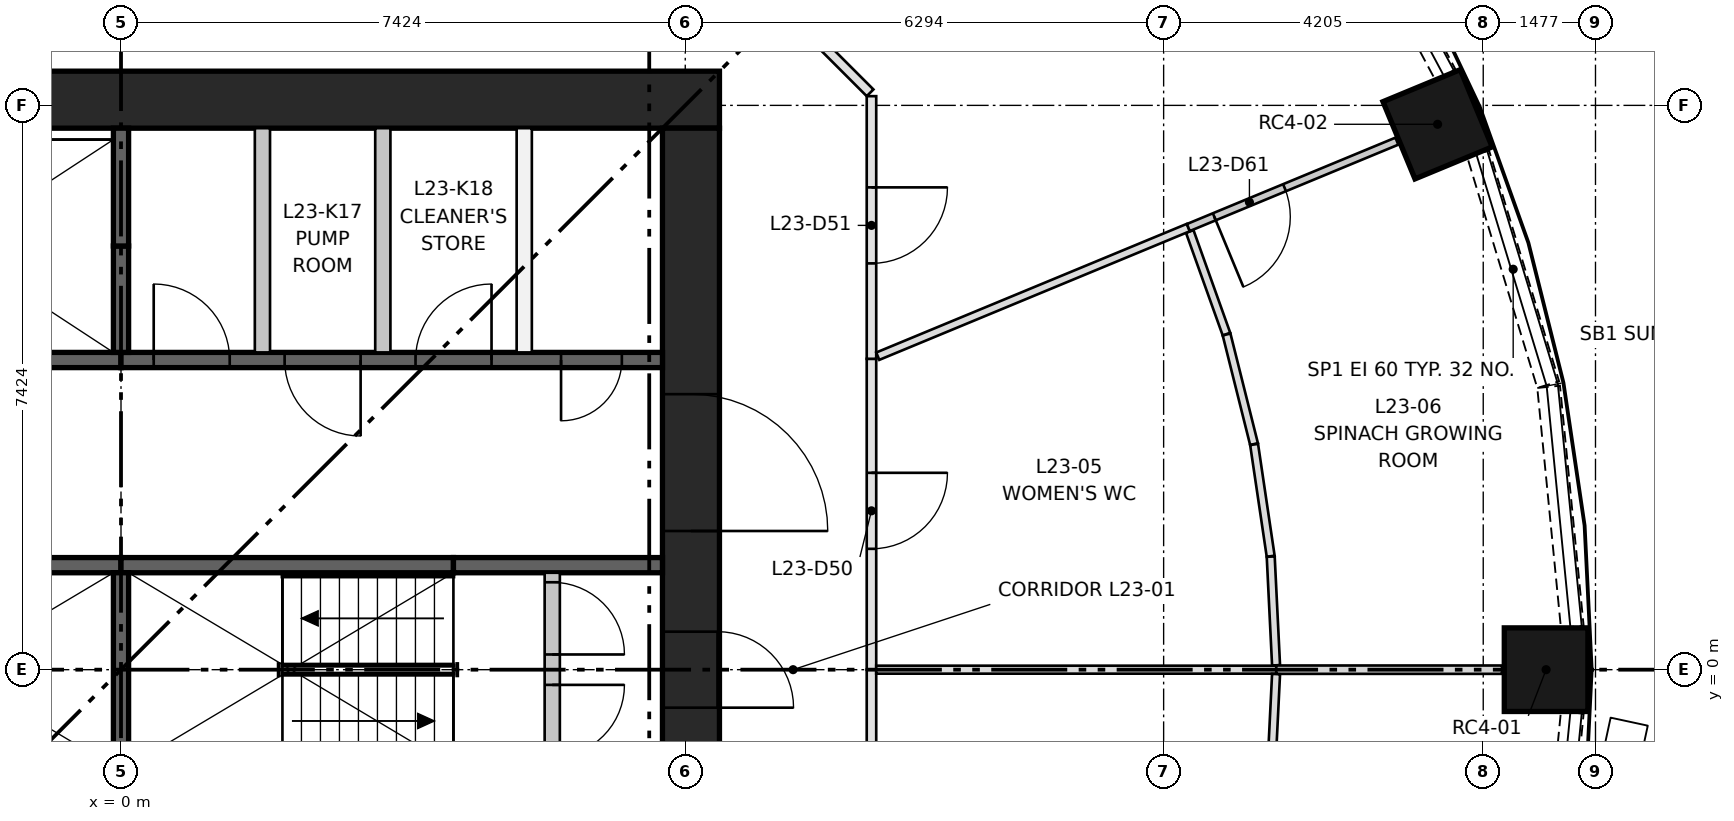
"""IFC4 building model, lengths in metres.
Left out: names, types, materials, properties, quantities, classifications, styles, units other than length and angle.
Written with IfcOpenShell. Run it as: python <this file> out.ifc"""

import sys

from ifc_helpers import new_model, si_unit, direction, frame, frame_2d, origin, origin_2d, place, context, subcontext, project, spatial, rectangle, extrude, element, fill, save


model = new_model("IFC4")
c1 = context("Model", 3, precision=1e-05, world=origin(), true_north=direction((0.0, 1.0)))
c2 = subcontext(c1, "Body", "Model", "MODEL_VIEW")
j1 = project(units=[si_unit("LENGTHUNIT", "METRE"), si_unit("PLANEANGLEUNIT", "RADIAN")], contexts=[c1])
p1 = place(None, origin())
s1 = spatial("IfcSite", under=j1, at=p1, CompositionType="ELEMENT")
p2 = place(p1, origin())
s2 = spatial("IfcBuilding", under=s1, at=p2, CompositionType="ELEMENT")
p3 = place(p2, frame((0.0, 0.0, 91.0)))
s3 = spatial("IfcBuildingStorey", under=s2, at=p3, CompositionType="ELEMENT", Elevation=91.0)
for number, where, z_axis, x_axis in (
    (1, (18.75, 0.0, 0.0), (0.0, 0.0, 1.0), (1.0, 0.0, 0.0)),
    (2, (17.323, 7.175, 0.0), (0.0, 0.0, 1.0), (0.924, 0.383, 0.0)),
):
    element("IfcColumn", number, at=place(p3, frame(where, z_axis=z_axis, x_axis=x_axis)), inside=s3, PredefinedType="COLUMN", context=c2, shape_type="SweptSolid", body=[
        extrude(rectangle(XDim=1.1, YDim=1.1, at=origin_2d()), origin(), (0.0, 0.0, 1.0), 3.65),
    ])
p4 = place(p3, frame((-7.874, 7.499, 0.0), z_axis=(0.0, 0.0, 1.0), x_axis=(1.0, 0.0, 0.0)))
e3 = element("IfcWall", 3, at=p4, inside=s3, PredefinedType="SHEAR", context=c2, shape_type="SweptSolid", body=[
    extrude(rectangle(XDim=15.748, YDim=0.75, at=frame_2d((7.874, 0.0))), origin(), (0.0, 0.0, 1.0), 3.65),
])
p5 = place(p3, frame((7.499, -7.124, 0.0), z_axis=(0.0, 0.0, 1.0), x_axis=(0.0, 1.0, 0.0)))
e4 = element("IfcWall", 4, at=p5, inside=s3, PredefinedType="SHEAR", context=c2, shape_type="SweptSolid", body=[
    extrude(rectangle(XDim=14.248, YDim=0.75, at=frame_2d((7.124, 0.0))), origin(), (0.0, 0.0, 1.0), 3.65),
])
p6 = place(p5, frame((6.624, 0.0, 0.0)))
e5 = element("IfcOpeningElement", 5, at=p6, cuts=e4, PredefinedType="OPENING", context=c2, shape_type="SweptSolid", body=[
    extrude(rectangle(XDim=1.0, YDim=2.1, at=frame_2d((0.5, 1.05))), frame((0.0, 0.385, 0.0), z_axis=(0.0, -1.0, 0.0), x_axis=(1.0, 0.0, 0.0)), (0.0, 0.0, 1.0), 0.77),
])
p7 = place(p5, frame((3.5, 0.0, 0.0)))
e6 = element("IfcOpeningElement", 6, at=p7, cuts=e4, PredefinedType="OPENING", context=c2, shape_type="SweptSolid", body=[
    extrude(rectangle(XDim=1.8, YDim=2.1, at=frame_2d((0.9, 1.05))), frame((0.0, 0.385, 0.0), z_axis=(0.0, -1.0, 0.0), x_axis=(1.0, 0.0, 0.0)), (0.0, 0.0, 1.0), 0.77),
])
p8 = place(p5, frame((8.948, 0.0, 0.0)))
e7 = element("IfcOpeningElement", 7, at=p8, cuts=e4, PredefinedType="OPENING", context=c2, shape_type="SweptSolid", body=[
    extrude(rectangle(XDim=1.8, YDim=2.1, at=frame_2d((0.9, 1.05))), frame((0.0, 0.385, 0.0), z_axis=(0.0, -1.0, 0.0), x_axis=(1.0, 0.0, 0.0)), (0.0, 0.0, 1.0), 0.77),
])
p9 = place(p3, frame((-7.124, 4.074, 0.0), z_axis=(0.0, 0.0, 1.0), x_axis=(1.0, 0.0, 0.0)))
e8 = element("IfcWall", 8, at=p9, inside=s3, PredefinedType="SHEAR", context=c2, shape_type="SweptSolid", body=[
    extrude(rectangle(XDim=7.124, YDim=0.2, at=frame_2d((3.562, 0.0))), origin(), (0.0, 0.0, 1.0), 3.3),
])
p10 = place(p3, frame((0.0, 4.074, 0.0), z_axis=(0.0, 0.0, 1.0), x_axis=(1.0, 0.0, 0.0)))
e9 = element("IfcWall", 9, at=p10, inside=s3, PredefinedType="SHEAR", context=c2, shape_type="SweptSolid", body=[
    extrude(rectangle(XDim=7.124, YDim=0.2, at=frame_2d((3.562, 0.0))), origin(), (0.0, 0.0, 1.0), 3.3),
])
p11 = place(p10, frame((0.43, 0.0, 0.0)))
e10 = element("IfcOpeningElement", 10, at=p11, cuts=e9, PredefinedType="OPENING", context=c2, shape_type="SweptSolid", body=[
    extrude(rectangle(XDim=1.0, YDim=2.1, at=frame_2d((0.5, 1.05))), frame((0.0, 0.11, 0.0), z_axis=(0.0, -1.0, 0.0), x_axis=(1.0, 0.0, 0.0)), (0.0, 0.0, 1.0), 0.22),
])
p12 = place(p10, frame((2.153, 0.0, 0.0)))
e11 = element("IfcOpeningElement", 11, at=p12, cuts=e9, PredefinedType="OPENING", context=c2, shape_type="SweptSolid", body=[
    extrude(rectangle(XDim=1.0, YDim=2.1, at=frame_2d((0.5, 1.05))), frame((0.0, 0.11, 0.0), z_axis=(0.0, -1.0, 0.0), x_axis=(1.0, 0.0, 0.0)), (0.0, 0.0, 1.0), 0.22),
])
p13 = place(p10, frame((3.875, 0.0, 0.0)))
e12 = element("IfcOpeningElement", 12, at=p13, cuts=e9, PredefinedType="OPENING", context=c2, shape_type="SweptSolid", body=[
    extrude(rectangle(XDim=1.0, YDim=2.1, at=frame_2d((0.5, 1.05))), frame((0.0, 0.11, 0.0), z_axis=(0.0, -1.0, 0.0), x_axis=(1.0, 0.0, 0.0)), (0.0, 0.0, 1.0), 0.22),
])
p14 = place(p10, frame((5.79, 0.0, 0.0)))
e13 = element("IfcOpeningElement", 13, at=p14, cuts=e9, PredefinedType="OPENING", context=c2, shape_type="SweptSolid", body=[
    extrude(rectangle(XDim=0.8, YDim=2.1, at=frame_2d((0.4, 1.05))), frame((0.0, 0.11, 0.0), z_axis=(0.0, -1.0, 0.0), x_axis=(1.0, 0.0, 0.0)), (0.0, 0.0, 1.0), 0.22),
])
for number, where, z_axis, x_axis in (
    (14, (-4.374, 1.375, 0.0), (0.0, 0.0, 1.0), (1.0, 0.0, 0.0)),
    (15, (0.0, 1.375, 0.0), (0.0, 0.0, 1.0), (1.0, 0.0, 0.0)),
):
    element("IfcWall", number, at=place(p3, frame(where, z_axis=z_axis, x_axis=x_axis)), inside=s3, PredefinedType="SHEAR", context=c2, shape_type="SweptSolid", body=[
        extrude(rectangle(XDim=4.374, YDim=0.2, at=frame_2d((2.187, 0.0))), origin(), (0.0, 0.0, 1.0), 3.3),
    ])
p15 = place(p3, frame((4.374, 1.375, 0.0), z_axis=(0.0, 0.0, 1.0), x_axis=(1.0, 0.0, 0.0)))
e16 = element("IfcWall", 16, at=p15, inside=s3, PredefinedType="SHEAR", context=c2, shape_type="SweptSolid", body=[
    extrude(rectangle(XDim=2.75, YDim=0.2, at=frame_2d((1.375, 0.0))), origin(), (0.0, 0.0, 1.0), 3.3),
])
p16 = place(p3, frame((0.0, -1.275, 0.0), z_axis=(0.0, 0.0, 1.0), x_axis=(0.0, 1.0, 0.0)))
e17 = element("IfcWall", 17, at=p16, inside=s3, PredefinedType="SHEAR", context=c2, shape_type="SweptSolid", body=[
    extrude(rectangle(XDim=2.55, YDim=0.2, at=frame_2d((1.275, 0.0))), origin(), (0.0, 0.0, 1.0), 3.3),
])
p17 = place(p3, frame((0.0, 4.174, 0.0), z_axis=(0.0, 0.0, 1.0), x_axis=(0.0, 1.0, 0.0)))
e18 = element("IfcWall", 18, at=p17, inside=s3, PredefinedType="SHEAR", context=c2, shape_type="SweptSolid", body=[
    extrude(rectangle(XDim=1.4, YDim=0.2, at=frame_2d((0.7, 0.0))), origin(), (0.0, 0.0, 1.0), 3.3),
])
p18 = place(p3, frame((0.0, 5.574, 0.0), z_axis=(0.0, 0.0, 1.0), x_axis=(0.0, 1.0, 0.0)))
e19 = element("IfcWall", 19, at=p18, inside=s3, PredefinedType="SHEAR", context=c2, shape_type="SweptSolid", body=[
    extrude(rectangle(XDim=1.55, YDim=0.2, at=frame_2d((0.775, 0.0))), origin(), (0.0, 0.0, 1.0), 3.3),
])
for number, where, z_axis, x_axis in (
    (20, (1.861, 4.174, 0.0), (0.0, 0.0, 1.0), (0.0, 1.0, 0.0)),
    (21, (3.445, 4.174, 0.0), (0.0, 0.0, 1.0), (0.0, 1.0, 0.0)),
    (22, (5.305, 4.174, 0.0), (0.0, 0.0, 1.0), (0.0, 1.0, 0.0)),
):
    element("IfcWall", number, at=place(p3, frame(where, z_axis=z_axis, x_axis=x_axis)), inside=s3, PredefinedType="PARTITIONING", context=c2, shape_type="SweptSolid", body=[
        extrude(rectangle(XDim=2.95, YDim=0.2, at=frame_2d((1.475, 0.0))), origin(), (0.0, 0.0, 1.0), 3.3),
    ])
p19 = place(p3, frame((5.674, -1.275, 0.0), z_axis=(0.0, 0.0, 1.0), x_axis=(0.0, 1.0, 0.0)))
e23 = element("IfcWall", 23, at=p19, inside=s3, PredefinedType="PARTITIONING", context=c2, shape_type="SweptSolid", body=[
    extrude(rectangle(XDim=2.55, YDim=0.2, at=frame_2d((1.275, 0.0))), origin(), (0.0, 0.0, 1.0), 3.3),
])
p20 = place(p19, frame((0.125, 0.0, 0.0)))
e24 = element("IfcOpeningElement", 24, at=p20, cuts=e23, PredefinedType="OPENING", context=c2, shape_type="SweptSolid", body=[
    extrude(rectangle(XDim=0.95, YDim=2.1, at=frame_2d((0.475, 1.05))), frame((0.0, 0.11, 0.0), z_axis=(0.0, -1.0, 0.0), x_axis=(1.0, 0.0, 0.0)), (0.0, 0.0, 1.0), 0.22),
])
p21 = place(p19, frame((1.475, 0.0, 0.0)))
e25 = element("IfcOpeningElement", 25, at=p21, cuts=e23, PredefinedType="OPENING", context=c2, shape_type="SweptSolid", body=[
    extrude(rectangle(XDim=0.95, YDim=2.1, at=frame_2d((0.475, 1.05))), frame((0.0, 0.11, 0.0), z_axis=(0.0, -1.0, 0.0), x_axis=(1.0, 0.0, 0.0)), (0.0, 0.0, 1.0), 0.22),
])
p22 = place(p3, frame((19.094, 0.564, 0.0), z_axis=(0.0, 0.0, 1.0), x_axis=(-0.098040704044, 0.995182405567, 0.0)))
e26 = element("IfcWall", 26, at=p22, inside=s3, PredefinedType="SOLIDWALL", context=c2, shape_type="SweptSolid", body=[
    extrude(rectangle(XDim=3.173, YDim=0.3, at=frame_2d((1.586, 0.0))), origin(), (0.0, 0.0, 1.0), 0.9),
])
p23 = place(p3, frame((18.778, 3.75, 0.0), z_axis=(0.0, 0.0, 1.0), x_axis=(-0.290325591482, 0.956927923582, 0.0)))
e27 = element("IfcWall", 27, at=p23, inside=s3, PredefinedType="SOLIDWALL", context=c2, shape_type="SweptSolid", body=[
    extrude(rectangle(XDim=3.173, YDim=0.3, at=frame_2d((1.586, 0.0))), origin(), (0.0, 0.0, 1.0), 0.9),
])
p24 = place(p3, frame((17.425, 7.828, 0.0), z_axis=(0.0, 0.0, 1.0), x_axis=(-0.471458802606, 0.88188808669, 0.0)))
e28 = element("IfcWall", 28, at=p24, inside=s3, PredefinedType="SOLIDWALL", context=c2, shape_type="SweptSolid", body=[
    extrude(rectangle(XDim=3.172, YDim=0.3, at=frame_2d((1.586, 0.0))), origin(), (0.0, 0.0, 1.0), 0.9),
])
p25 = place(p3, frame((18.783, -3.721, 0.0), z_axis=(0.0, 0.0, 1.0), x_axis=(0.098040704044, 0.995182405567, 0.0)))
e29 = element("IfcWall", 29, at=p25, inside=s3, PredefinedType="SOLIDWALL", context=c2, shape_type="SweptSolid", body=[
    extrude(rectangle(XDim=3.173, YDim=0.3, at=frame_2d((1.586, 0.0))), origin(), (0.0, 0.0, 1.0), 0.9),
])
p26 = place(p3, frame((9.874, 4.09, 0.0), z_axis=(0.0, 0.0, 1.0), x_axis=(0.0, -1.0, 0.0)))
e30 = element("IfcWall", 30, at=p26, inside=s3, PredefinedType="PARTITIONING", context=c2, shape_type="SweptSolid", body=[
    extrude(rectangle(XDim=4.09, YDim=0.125, at=frame_2d((2.045, 0.0))), origin(), (0.0, 0.0, 1.0), 3.3),
])
p27 = place(p26, frame((1.5, 0.0, 0.0)))
e31 = element("IfcOpeningElement", 31, at=p27, cuts=e30, PredefinedType="OPENING", context=c2, shape_type="SweptSolid", body=[
    extrude(rectangle(XDim=1.0, YDim=2.1, at=frame_2d((0.5, 1.05))), frame((0.0, 0.073, 0.0), z_axis=(0.0, -1.0, 0.0), x_axis=(1.0, 0.0, 0.0)), (0.0, 0.0, 1.0), 0.145),
])
p28 = place(p3, frame((8.722, 8.722, 0.0), z_axis=(0.0, 0.0, 1.0), x_axis=(0.70718294931, -0.707030604857, 0.0)))
e32 = element("IfcWall", 32, at=p28, inside=s3, PredefinedType="PARTITIONING", context=c2, shape_type="SweptSolid", body=[
    extrude(rectangle(XDim=1.603, YDim=0.125, at=frame_2d((0.801, 0.0))), origin(), (0.0, 0.0, 1.0), 3.3),
])
p29 = place(p3, frame((9.874, 7.545, 0.0), z_axis=(0.0, 0.0, 1.0), x_axis=(0.0, -1.0, 0.0)))
e33 = element("IfcWall", 33, at=p29, inside=s3, PredefinedType="PARTITIONING", context=c2, shape_type="SweptSolid", body=[
    extrude(rectangle(XDim=3.455, YDim=0.125, at=frame_2d((1.728, 0.0))), origin(), (0.0, 0.0, 1.0), 3.3),
])
p30 = place(p29, frame((1.2, 0.0, 0.0)))
e34 = element("IfcOpeningElement", 34, at=p30, cuts=e33, PredefinedType="OPENING", context=c2, shape_type="SweptSolid", body=[
    extrude(rectangle(XDim=1.0, YDim=2.1, at=frame_2d((0.5, 1.05))), frame((0.0, 0.073, 0.0), z_axis=(0.0, -1.0, 0.0), x_axis=(1.0, 0.0, 0.0)), (0.0, 0.0, 1.0), 0.145),
])
p31 = place(p3, frame((9.874, 0.0, 0.0), z_axis=(0.0, 0.0, 1.0), x_axis=(0.0, -1.0, 0.0)))
e35 = element("IfcWall", 35, at=p31, inside=s3, PredefinedType="PARTITIONING", context=c2, shape_type="SweptSolid", body=[
    extrude(rectangle(XDim=4.09, YDim=0.125, at=frame_2d((2.045, 0.0))), origin(), (0.0, 0.0, 1.0), 3.3),
])
p32 = place(p31, frame((1.5, 0.0, 0.0)))
e36 = element("IfcOpeningElement", 36, at=p32, cuts=e35, PredefinedType="OPENING", context=c2, shape_type="SweptSolid", body=[
    extrude(rectangle(XDim=1.0, YDim=2.1, at=frame_2d((0.5, 1.05))), frame((0.0, 0.073, 0.0), z_axis=(0.0, -1.0, 0.0), x_axis=(1.0, 0.0, 0.0)), (0.0, 0.0, 1.0), 0.145),
])
p33 = place(p3, frame((14.062, 5.765, 0.0), z_axis=(0.0, 0.0, 1.0), x_axis=(0.336940319535, -0.941526006583, 0.0)))
e37 = element("IfcWall", 37, at=p33, inside=s3, PredefinedType="PARTITIONING", context=c2, shape_type="SweptSolid", body=[
    extrude(rectangle(XDim=1.434, YDim=0.105, at=frame_2d((0.717, 0.0))), origin(), (0.0, 0.0, 1.0), 3.3),
])
p34 = place(p3, frame((14.546, 4.41, 0.0), z_axis=(0.0, 0.0, 1.0), x_axis=(0.242922070527, -0.970045806986, 0.0)))
e38 = element("IfcWall", 38, at=p34, inside=s3, PredefinedType="PARTITIONING", context=c2, shape_type="SweptSolid", body=[
    extrude(rectangle(XDim=1.486, YDim=0.105, at=frame_2d((0.743, 0.0))), origin(), (0.0, 0.0, 1.0), 3.3),
])
p35 = place(p3, frame((14.908, 2.963, 0.0), z_axis=(0.0, 0.0, 1.0), x_axis=(0.146822447166, -0.989162862732, 0.0)))
e39 = element("IfcWall", 39, at=p35, inside=s3, PredefinedType="PARTITIONING", context=c2, shape_type="SweptSolid", body=[
    extrude(rectangle(XDim=1.487, YDim=0.105, at=frame_2d((0.743, 0.0))), origin(), (0.0, 0.0, 1.0), 3.3),
])
p36 = place(p3, frame((15.127, 1.487, 0.0), z_axis=(0.0, 0.0, 1.0), x_axis=(0.0491209592, -0.998792837062, 0.0)))
e40 = element("IfcWall", 40, at=p36, inside=s3, PredefinedType="PARTITIONING", context=c2, shape_type="SweptSolid", body=[
    extrude(rectangle(XDim=1.431, YDim=0.105, at=frame_2d((0.716, 0.0))), origin(), (0.0, 0.0, 1.0), 3.3),
])
p37 = place(p3, frame((9.957, 4.124, 0.0), z_axis=(0.0, 0.0, 1.0), x_axis=(0.923862097388, 0.382725521764, 0.0)))
e41 = element("IfcWall", 41, at=p37, inside=s3, PredefinedType="PARTITIONING", context=c2, shape_type="SweptSolid", body=[
    extrude(rectangle(XDim=4.423, YDim=0.105, at=frame_2d((2.211, 0.0))), origin(), (0.0, 0.0, 1.0), 3.3),
])
p38 = place(p3, frame((15.2, 0.0, 0.0), z_axis=(0.0, 0.0, 1.0), x_axis=(-1.0, 0.0, 0.0)))
e42 = element("IfcWall", 42, at=p38, inside=s3, PredefinedType="PARTITIONING", context=c2, shape_type="SweptSolid", body=[
    extrude(rectangle(XDim=5.263, YDim=0.105, at=frame_2d((2.632, 0.0))), origin(), (0.0, 0.0, 1.0), 3.3),
])
p39 = place(p3, frame((16.787, 6.953, 0.0), z_axis=(0.0, 0.0, 1.0), x_axis=(-0.923889594764, -0.382659139036, 0.0)))
e43 = element("IfcWall", 43, at=p39, inside=s3, PredefinedType="PARTITIONING", context=c2, shape_type="SweptSolid", body=[
    extrude(rectangle(XDim=2.97, YDim=0.1, at=frame_2d((1.485, 0.0))), origin(), (0.0, 0.0, 1.0), 3.3),
])
p40 = place(p39, frame((1.6, 0.0, 0.0)))
e44 = element("IfcOpeningElement", 44, at=p40, cuts=e43, PredefinedType="OPENING", context=c2, shape_type="SweptSolid", body=[
    extrude(rectangle(XDim=1.0, YDim=2.1, at=frame_2d((0.5, 1.05))), frame((0.0, 0.06, 0.0), z_axis=(0.0, -1.0, 0.0), x_axis=(1.0, 0.0, 0.0)), (0.0, 0.0, 1.0), 0.12),
])
p41 = place(p3, frame((18.17, 0.0, 0.0), z_axis=(0.0, 0.0, 1.0), x_axis=(-1.0, 0.0, 0.0)))
e45 = element("IfcWall", 45, at=p41, inside=s3, PredefinedType="PARTITIONING", context=c2, shape_type="SweptSolid", body=[
    extrude(rectangle(XDim=2.97, YDim=0.11, at=frame_2d((1.485, 0.0))), origin(), (0.0, 0.0, 1.0), 3.3),
])
p42 = place(p3, frame((15.127, -1.487, 0.0), z_axis=(0.0, 0.0, 1.0), x_axis=(0.0491209592, 0.998792837062, 0.0)))
e46 = element("IfcWall", 46, at=p42, inside=s3, PredefinedType="PARTITIONING", context=c2, shape_type="SweptSolid", body=[
    extrude(rectangle(XDim=1.431, YDim=0.105, at=frame_2d((0.716, 0.0))), origin(), (0.0, 0.0, 1.0), 3.3),
])
p43 = place(p20, frame((0.95, 0.0, 0.0), z_axis=(0.0, 0.0, 1.0), x_axis=(-1.0, 0.0, 0.0)))
e47 = element("IfcDoor", 47, at=p43, inside=s3, OperationType="SINGLE_SWING_RIGHT", PredefinedType="DOOR", context=c2, shape_type="SweptSolid", body=[
    extrude(rectangle(XDim=0.95, YDim=2.1, at=frame_2d((0.475, 1.05))), frame((0.0, 0.025, 0.0), z_axis=(0.0, -1.0, 0.0), x_axis=(1.0, 0.0, 0.0)), (0.0, 0.0, 1.0), 0.05),
])
fill(e24, e47)
p44 = place(p21, frame((0.95, 0.0, 0.0), z_axis=(0.0, 0.0, 1.0), x_axis=(-1.0, 0.0, 0.0)))
e48 = element("IfcDoor", 48, at=p44, inside=s3, OperationType="SINGLE_SWING_LEFT", PredefinedType="DOOR", context=c2, shape_type="SweptSolid", body=[
    extrude(rectangle(XDim=0.95, YDim=2.1, at=frame_2d((0.475, 1.05))), frame((0.0, 0.025, 0.0), z_axis=(0.0, -1.0, 0.0), x_axis=(1.0, 0.0, 0.0)), (0.0, 0.0, 1.0), 0.05),
])
fill(e25, e48)
p45 = place(p11, origin())
e49 = element("IfcDoor", 49, at=p45, inside=s3, OperationType="SINGLE_SWING_LEFT", PredefinedType="DOOR", context=c2, shape_type="SweptSolid", body=[
    extrude(rectangle(XDim=1.0, YDim=2.1, at=frame_2d((0.5, 1.05))), frame((0.0, 0.025, 0.0), z_axis=(0.0, -1.0, 0.0), x_axis=(1.0, 0.0, 0.0)), (0.0, 0.0, 1.0), 0.05),
])
fill(e10, e49)
p46 = place(p12, frame((1.0, 0.0, 0.0), z_axis=(0.0, 0.0, 1.0), x_axis=(-1.0, 0.0, 0.0)))
e50 = element("IfcDoor", 50, at=p46, inside=s3, OperationType="SINGLE_SWING_RIGHT", PredefinedType="DOOR", context=c2, shape_type="SweptSolid", body=[
    extrude(rectangle(XDim=1.0, YDim=2.1, at=frame_2d((0.5, 1.05))), frame((0.0, 0.025, 0.0), z_axis=(0.0, -1.0, 0.0), x_axis=(1.0, 0.0, 0.0)), (0.0, 0.0, 1.0), 0.05),
])
fill(e11, e50)
p47 = place(p13, origin())
e51 = element("IfcDoor", 51, at=p47, inside=s3, OperationType="SINGLE_SWING_RIGHT", PredefinedType="DOOR", context=c2, shape_type="SweptSolid", body=[
    extrude(rectangle(XDim=1.0, YDim=2.1, at=frame_2d((0.5, 1.05))), frame((0.0, 0.025, 0.0), z_axis=(0.0, -1.0, 0.0), x_axis=(1.0, 0.0, 0.0)), (0.0, 0.0, 1.0), 0.05),
])
fill(e12, e51)
p48 = place(p14, frame((0.8, 0.0, 0.0), z_axis=(0.0, 0.0, 1.0), x_axis=(-1.0, 0.0, 0.0)))
e52 = element("IfcDoor", 52, at=p48, inside=s3, OperationType="SINGLE_SWING_LEFT", PredefinedType="DOOR", context=c2, shape_type="SweptSolid", body=[
    extrude(rectangle(XDim=0.8, YDim=2.1, at=frame_2d((0.4, 1.05))), frame((0.0, 0.025, 0.0), z_axis=(0.0, -1.0, 0.0), x_axis=(1.0, 0.0, 0.0)), (0.0, 0.0, 1.0), 0.05),
])
fill(e13, e52)
p49 = place(p6, frame((1.0, 0.0, 0.0), z_axis=(0.0, 0.0, 1.0), x_axis=(-1.0, 0.0, 0.0)))
e53 = element("IfcDoor", 53, at=p49, inside=s3, OperationType="SINGLE_SWING_LEFT", PredefinedType="DOOR", context=c2, shape_type="SweptSolid", body=[
    extrude(rectangle(XDim=1.0, YDim=2.1, at=frame_2d((0.5, 1.05))), frame((0.0, 0.375, 0.0), z_axis=(0.0, -1.0, 0.0), x_axis=(1.0, 0.0, 0.0)), (0.0, 0.0, 1.0), 0.05),
])
fill(e5, e53)
p50 = place(p8, frame((1.8, 0.0, 0.0), z_axis=(0.0, 0.0, 1.0), x_axis=(-1.0, 0.0, 0.0)))
e54 = element("IfcDoor", 54, at=p50, inside=s3, OperationType="DOUBLE_DOOR_SINGLE_SWING", PredefinedType="DOOR", context=c2, shape_type="SweptSolid", body=[
    extrude(rectangle(XDim=1.8, YDim=2.1, at=frame_2d((0.9, 1.05))), frame((0.0, 0.025, 0.0), z_axis=(0.0, -1.0, 0.0), x_axis=(1.0, 0.0, 0.0)), (0.0, 0.0, 1.0), 0.05),
])
fill(e7, e54)
p51 = place(p27, origin())
e55 = element("IfcDoor", 55, at=p51, inside=s3, OperationType="SINGLE_SWING_LEFT", PredefinedType="DOOR", context=c2, shape_type="SweptSolid", body=[
    extrude(rectangle(XDim=1.0, YDim=2.1, at=frame_2d((0.5, 1.05))), frame((0.0, 0.025, 0.0), z_axis=(0.0, -1.0, 0.0), x_axis=(1.0, 0.0, 0.0)), (0.0, 0.0, 1.0), 0.05),
])
fill(e31, e55)
p52 = place(p30, origin())
e56 = element("IfcDoor", 56, at=p52, inside=s3, OperationType="SINGLE_SWING_LEFT", PredefinedType="DOOR", context=c2, shape_type="SweptSolid", body=[
    extrude(rectangle(XDim=1.0, YDim=2.1, at=frame_2d((0.5, 1.05))), frame((0.0, 0.025, 0.0), z_axis=(0.0, -1.0, 0.0), x_axis=(1.0, 0.0, 0.0)), (0.0, 0.0, 1.0), 0.05),
])
fill(e34, e56)
p53 = place(p40, origin())
e57 = element("IfcDoor", 57, at=p53, inside=s3, OperationType="SINGLE_SWING_RIGHT", PredefinedType="DOOR", context=c2, shape_type="SweptSolid", body=[
    extrude(rectangle(XDim=1.0, YDim=2.1, at=frame_2d((0.5, 1.05))), frame((0.0, 0.025, 0.0), z_axis=(0.0, -1.0, 0.0), x_axis=(1.0, 0.0, 0.0)), (0.0, 0.0, 1.0), 0.05),
])
fill(e44, e57)
save(model, sys.argv[1])
